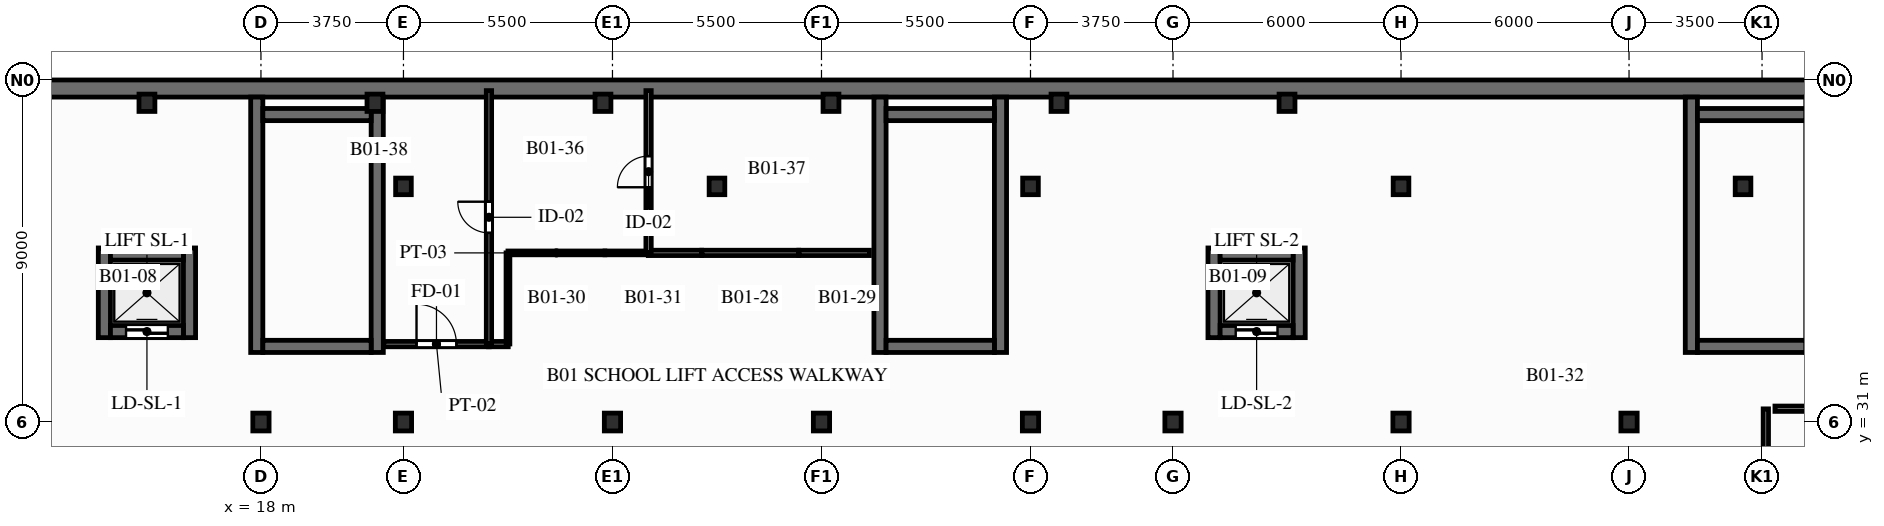
"""IFC4 building model, lengths in metres.
Left out: names, types, materials, properties, quantities, classifications, styles, units other than length and angle.
Written with IfcOpenShell. Run it as: python <this file> out.ifc"""

import sys

from ifc_helpers import new_model, si_unit, direction, frame, frame_2d, origin, origin_2d, place, context, subcontext, project, spatial, rectangle, i_section, extrude, element, fill, save


model = new_model("IFC4")
c1 = context("Model", 3, precision=1e-05, world=origin(), true_north=direction((0.0, 1.0)))
c2 = subcontext(c1, "Body", "Model", "MODEL_VIEW")
j1 = project(units=[si_unit("LENGTHUNIT", "METRE"), si_unit("PLANEANGLEUNIT", "RADIAN")], contexts=[c1])
p1 = place(None, origin())
s1 = spatial("IfcSite", under=j1, at=p1, CompositionType="ELEMENT")
p2 = place(p1, origin())
s2 = spatial("IfcBuilding", under=s1, at=p2, CompositionType="ELEMENT")
p3 = place(p2, frame((0.0, 0.0, -4.2)))
s3 = spatial("IfcBuildingStorey", under=s2, at=p3, CompositionType="ELEMENT", Elevation=-4.2)
for number, where, z_axis, x_axis in (
    (1, (15.0, 39.4, 0.0), (0.0, 0.0, 1.0), (1.0, 0.0, 0.0)),
    (2, (21.0, 39.4, 0.0), (0.0, 0.0, 1.0), (1.0, 0.0, 0.0)),
    (3, (27.0, 39.4, 0.0), (0.0, 0.0, 1.0), (1.0, 0.0, 0.0)),
    (4, (33.0, 39.4, 0.0), (0.0, 0.0, 1.0), (1.0, 0.0, 0.0)),
    (5, (39.0, 39.4, 0.0), (0.0, 0.0, 1.0), (1.0, 0.0, 0.0)),
    (6, (45.0, 39.4, 0.0), (0.0, 0.0, 1.0), (1.0, 0.0, 0.0)),
):
    element("IfcColumn", number, at=place(p3, frame(where, z_axis=z_axis, x_axis=x_axis)), inside=s3, PredefinedType="COLUMN", context=c2, shape_type="SweptSolid", body=[
        extrude(i_section(OverallWidth=0.418, OverallDepth=0.456, WebThickness=0.042, FlangeThickness=0.067, FilletRadius=0.015, at=origin_2d()), origin(), (0.0, 0.0, 1.0), 4.2),
    ])
for number, where, z_axis, x_axis in (
    (7, (18.0, 31.0, 0.0), (0.0, 0.0, 1.0), (1.0, 0.0, 0.0)),
    (8, (21.75, 31.0, 0.0), (0.0, 0.0, 1.0), (1.0, 0.0, 0.0)),
):
    element("IfcColumn", number, at=place(p3, frame(where, z_axis=z_axis, x_axis=x_axis)), inside=s3, PredefinedType="COLUMN", context=c2, shape_type="SweptSolid", body=[
        extrude(i_section(OverallWidth=0.428, OverallDepth=0.469, WebThickness=0.078, FlangeThickness=0.125, FilletRadius=0.015, at=origin_2d()), origin(), (0.0, 0.0, 1.0), 4.2),
    ])
p4 = place(p3, frame((21.75, 37.2, 0.0), z_axis=(0.0, 0.0, 1.0), x_axis=(1.0, 0.0, 0.0)))
e9 = element("IfcColumn", 9, at=p4, inside=s3, PredefinedType="COLUMN", context=c2, shape_type="SweptSolid", body=[
    extrude(i_section(OverallWidth=0.412, OverallDepth=0.437, WebThickness=0.036, FlangeThickness=0.058, FilletRadius=0.015, at=origin_2d()), origin(), (0.0, 0.0, 1.0), 4.2),
])
p5 = place(p3, frame((27.25, 31.0, 0.0), z_axis=(0.0, 0.0, 1.0), x_axis=(1.0, 0.0, 0.0)))
e10 = element("IfcColumn", 10, at=p5, inside=s3, PredefinedType="COLUMN", context=c2, shape_type="SweptSolid", body=[
    extrude(i_section(OverallWidth=0.428, OverallDepth=0.469, WebThickness=0.078, FlangeThickness=0.125, FilletRadius=0.015, at=origin_2d()), origin(), (0.0, 0.0, 1.0), 4.2),
])
p6 = place(p3, frame((30.0, 37.2, 0.0), z_axis=(0.0, 0.0, 1.0), x_axis=(1.0, 0.0, 0.0)))
e11 = element("IfcColumn", 11, at=p6, inside=s3, PredefinedType="COLUMN", context=c2, shape_type="SweptSolid", body=[
    extrude(i_section(OverallWidth=0.412, OverallDepth=0.437, WebThickness=0.036, FlangeThickness=0.058, FilletRadius=0.015, at=origin_2d()), origin(), (0.0, 0.0, 1.0), 4.2),
])
for number, where, z_axis, x_axis in (
    (12, (32.75, 31.0, 0.0), (0.0, 0.0, 1.0), (1.0, 0.0, 0.0)),
    (13, (38.25, 31.0, 0.0), (0.0, 0.0, 1.0), (1.0, 0.0, 0.0)),
):
    element("IfcColumn", number, at=place(p3, frame(where, z_axis=z_axis, x_axis=x_axis)), inside=s3, PredefinedType="COLUMN", context=c2, shape_type="SweptSolid", body=[
        extrude(i_section(OverallWidth=0.428, OverallDepth=0.469, WebThickness=0.078, FlangeThickness=0.125, FilletRadius=0.015, at=origin_2d()), origin(), (0.0, 0.0, 1.0), 4.2),
    ])
p7 = place(p3, frame((38.25, 37.2, 0.0), z_axis=(0.0, 0.0, 1.0), x_axis=(1.0, 0.0, 0.0)))
e14 = element("IfcColumn", 14, at=p7, inside=s3, PredefinedType="COLUMN", context=c2, shape_type="SweptSolid", body=[
    extrude(i_section(OverallWidth=0.412, OverallDepth=0.437, WebThickness=0.036, FlangeThickness=0.058, FilletRadius=0.015, at=origin_2d()), origin(), (0.0, 0.0, 1.0), 4.2),
])
for number, where, z_axis, x_axis in (
    (15, (42.0, 31.0, 0.0), (0.0, 0.0, 1.0), (1.0, 0.0, 0.0)),
    (16, (48.0, 31.0, 0.0), (0.0, 0.0, 1.0), (1.0, 0.0, 0.0)),
):
    element("IfcColumn", number, at=place(p3, frame(where, z_axis=z_axis, x_axis=x_axis)), inside=s3, PredefinedType="COLUMN", context=c2, shape_type="SweptSolid", body=[
        extrude(i_section(OverallWidth=0.428, OverallDepth=0.469, WebThickness=0.078, FlangeThickness=0.125, FilletRadius=0.015, at=origin_2d()), origin(), (0.0, 0.0, 1.0), 4.2),
    ])
p8 = place(p3, frame((48.0, 37.2, 0.0), z_axis=(0.0, 0.0, 1.0), x_axis=(1.0, 0.0, 0.0)))
e17 = element("IfcColumn", 17, at=p8, inside=s3, PredefinedType="COLUMN", context=c2, shape_type="SweptSolid", body=[
    extrude(i_section(OverallWidth=0.412, OverallDepth=0.437, WebThickness=0.036, FlangeThickness=0.058, FilletRadius=0.015, at=origin_2d()), origin(), (0.0, 0.0, 1.0), 4.2),
])
p9 = place(p3, frame((54.0, 31.0, 0.0), z_axis=(0.0, 0.0, 1.0), x_axis=(1.0, 0.0, 0.0)))
e18 = element("IfcColumn", 18, at=p9, inside=s3, PredefinedType="COLUMN", context=c2, shape_type="SweptSolid", body=[
    extrude(i_section(OverallWidth=0.428, OverallDepth=0.469, WebThickness=0.078, FlangeThickness=0.125, FilletRadius=0.015, at=origin_2d()), origin(), (0.0, 0.0, 1.0), 4.2),
])
p10 = place(p3, frame((57.0, 37.2, 0.0), z_axis=(0.0, 0.0, 1.0), x_axis=(1.0, 0.0, 0.0)))
e19 = element("IfcColumn", 19, at=p10, inside=s3, PredefinedType="COLUMN", context=c2, shape_type="SweptSolid", body=[
    extrude(i_section(OverallWidth=0.412, OverallDepth=0.437, WebThickness=0.036, FlangeThickness=0.058, FilletRadius=0.015, at=origin_2d()), origin(), (0.0, 0.0, 1.0), 4.2),
])
p11 = place(p3, frame((70.775, 39.775, 0.0), z_axis=(0.0, 0.0, 1.0), x_axis=(-1.0, 0.0, 0.0)))
e20 = element("IfcWall", 20, at=p11, inside=s3, PredefinedType="SHEAR", context=c2, shape_type="SweptSolid", body=[
    extrude(rectangle(XDim=81.55, YDim=0.45, at=frame_2d((40.775, 0.0))), origin(), (0.0, 0.0, 1.0), 3.22),
])
for number, where, z_axis, x_axis in (
    (21, (13.88, 33.22, 0.0), (0.0, 0.0, 1.0), (0.0, 1.0, 0.0)),
    (22, (16.12, 33.22, 0.0), (0.0, 0.0, 1.0), (0.0, 1.0, 0.0)),
):
    element("IfcWall", number, at=place(p3, frame(where, z_axis=z_axis, x_axis=x_axis)), inside=s3, PredefinedType="SHEAR", context=c2, shape_type="SweptSolid", body=[
        extrude(rectangle(XDim=2.36, YDim=0.32, at=frame_2d((1.18, 0.0))), origin(), (0.0, 0.0, 1.0), 3.86),
    ])
p12 = place(p3, frame((14.04, 33.38, 0.0), z_axis=(0.0, 0.0, 1.0), x_axis=(1.0, 0.0, 0.0)))
e23 = element("IfcWall", 23, at=p12, inside=s3, PredefinedType="SHEAR", context=c2, shape_type="SweptSolid", body=[
    extrude(rectangle(XDim=1.92, YDim=0.32, at=frame_2d((0.96, 0.0))), origin(), (0.0, 0.0, 1.0), 3.86),
])
p13 = place(p12, frame((0.41, 0.0, 0.0)))
e24 = element("IfcOpeningElement", 24, at=p13, cuts=e23, PredefinedType="OPENING", context=c2, shape_type="SweptSolid", body=[
    extrude(rectangle(XDim=1.1, YDim=2.06, at=frame_2d((0.55, 1.03))), frame((0.0, 0.17, 0.0), z_axis=(0.0, -1.0, 0.0), x_axis=(1.0, 0.0, 0.0)), (0.0, 0.0, 1.0), 0.34),
])
p14 = place(p3, frame((14.04, 35.42, 0.0), z_axis=(0.0, 0.0, 1.0), x_axis=(1.0, 0.0, 0.0)))
e25 = element("IfcWall", 25, at=p14, inside=s3, PredefinedType="SHEAR", context=c2, shape_type="SweptSolid", body=[
    extrude(rectangle(XDim=1.92, YDim=0.32, at=frame_2d((0.96, 0.0))), origin(), (0.0, 0.0, 1.0), 3.86),
])
for number, where, z_axis, x_axis in (
    (26, (43.08, 33.22, 0.0), (0.0, 0.0, 1.0), (0.0, 1.0, 0.0)),
    (27, (45.32, 33.22, 0.0), (0.0, 0.0, 1.0), (0.0, 1.0, 0.0)),
):
    element("IfcWall", number, at=place(p3, frame(where, z_axis=z_axis, x_axis=x_axis)), inside=s3, PredefinedType="SHEAR", context=c2, shape_type="SweptSolid", body=[
        extrude(rectangle(XDim=2.36, YDim=0.32, at=frame_2d((1.18, 0.0))), origin(), (0.0, 0.0, 1.0), 3.86),
    ])
p15 = place(p3, frame((43.24, 33.38, 0.0), z_axis=(0.0, 0.0, 1.0), x_axis=(1.0, 0.0, 0.0)))
e28 = element("IfcWall", 28, at=p15, inside=s3, PredefinedType="SHEAR", context=c2, shape_type="SweptSolid", body=[
    extrude(rectangle(XDim=1.92, YDim=0.32, at=frame_2d((0.96, 0.0))), origin(), (0.0, 0.0, 1.0), 3.86),
])
p16 = place(p15, frame((0.41, 0.0, 0.0)))
e29 = element("IfcOpeningElement", 29, at=p16, cuts=e28, PredefinedType="OPENING", context=c2, shape_type="SweptSolid", body=[
    extrude(rectangle(XDim=1.1, YDim=2.06, at=frame_2d((0.55, 1.03))), frame((0.0, 0.17, 0.0), z_axis=(0.0, -1.0, 0.0), x_axis=(1.0, 0.0, 0.0)), (0.0, 0.0, 1.0), 0.34),
])
p17 = place(p3, frame((43.24, 35.42, 0.0), z_axis=(0.0, 0.0, 1.0), x_axis=(1.0, 0.0, 0.0)))
e30 = element("IfcWall", 30, at=p17, inside=s3, PredefinedType="SHEAR", context=c2, shape_type="SweptSolid", body=[
    extrude(rectangle(XDim=1.92, YDim=0.32, at=frame_2d((0.96, 0.0))), origin(), (0.0, 0.0, 1.0), 3.86),
])
for number, where, z_axis, x_axis in (
    (31, (17.89, 32.83, 0.0), (0.0, 0.0, 1.0), (0.0, 1.0, 0.0)),
    (32, (21.06, 32.83, 0.0), (0.0, 0.0, 1.0), (0.0, 1.0, 0.0)),
):
    element("IfcWall", number, at=place(p3, frame(where, z_axis=z_axis, x_axis=x_axis)), inside=s3, PredefinedType="SHEAR", context=c2, shape_type="SweptSolid", body=[
        extrude(rectangle(XDim=6.72, YDim=0.32, at=frame_2d((3.36, 0.0))), origin(), (0.0, 0.0, 1.0), 3.86),
    ])
for number, where, z_axis, x_axis in (
    (33, (18.05, 32.99, 0.0), (0.0, 0.0, 1.0), (1.0, 0.0, 0.0)),
    (34, (18.05, 39.09, 0.0), (0.0, 0.0, 1.0), (1.0, 0.0, 0.0)),
):
    element("IfcWall", number, at=place(p3, frame(where, z_axis=z_axis, x_axis=x_axis)), inside=s3, PredefinedType="SHEAR", context=c2, shape_type="SweptSolid", body=[
        extrude(rectangle(XDim=2.85, YDim=0.32, at=frame_2d((1.425, 0.0))), origin(), (0.0, 0.0, 1.0), 3.86),
    ])
for number, where, z_axis, x_axis in (
    (35, (34.29, 32.83, 0.0), (0.0, 0.0, 1.0), (0.0, 1.0, 0.0)),
    (36, (37.46, 32.83, 0.0), (0.0, 0.0, 1.0), (0.0, 1.0, 0.0)),
):
    element("IfcWall", number, at=place(p3, frame(where, z_axis=z_axis, x_axis=x_axis)), inside=s3, PredefinedType="SHEAR", context=c2, shape_type="SweptSolid", body=[
        extrude(rectangle(XDim=6.72, YDim=0.32, at=frame_2d((3.36, 0.0))), origin(), (0.0, 0.0, 1.0), 3.86),
    ])
for number, where, z_axis, x_axis in (
    (37, (34.45, 32.99, 0.0), (0.0, 0.0, 1.0), (1.0, 0.0, 0.0)),
    (38, (34.45, 39.09, 0.0), (0.0, 0.0, 1.0), (1.0, 0.0, 0.0)),
):
    element("IfcWall", number, at=place(p3, frame(where, z_axis=z_axis, x_axis=x_axis)), inside=s3, PredefinedType="SHEAR", context=c2, shape_type="SweptSolid", body=[
        extrude(rectangle(XDim=2.85, YDim=0.32, at=frame_2d((1.425, 0.0))), origin(), (0.0, 0.0, 1.0), 3.86),
    ])
p18 = place(p3, frame((55.64, 32.83, 0.0), z_axis=(0.0, 0.0, 1.0), x_axis=(0.0, 1.0, 0.0)))
e39 = element("IfcWall", 39, at=p18, inside=s3, PredefinedType="SHEAR", context=c2, shape_type="SweptSolid", body=[
    extrude(rectangle(XDim=6.72, YDim=0.32, at=frame_2d((3.36, 0.0))), origin(), (0.0, 0.0, 1.0), 3.86),
])
for number, where, z_axis, x_axis in (
    (40, (55.8, 32.99, 0.0), (0.0, 0.0, 1.0), (1.0, 0.0, 0.0)),
    (41, (55.8, 39.09, 0.0), (0.0, 0.0, 1.0), (1.0, 0.0, 0.0)),
):
    element("IfcWall", number, at=place(p3, frame(where, z_axis=z_axis, x_axis=x_axis)), inside=s3, PredefinedType="SHEAR", context=c2, shape_type="SweptSolid", body=[
        extrude(rectangle(XDim=2.85, YDim=0.32, at=frame_2d((1.425, 0.0))), origin(), (0.0, 0.0, 1.0), 3.86),
    ])
p19 = place(p3, frame((23.989, 33.05, 0.0), z_axis=(0.0, 0.0, 1.0), x_axis=(1.0, 0.0, 0.0)))
e42 = element("IfcWall", 42, at=p19, inside=s3, PredefinedType="PARTITIONING", context=c2, shape_type="SweptSolid", body=[
    extrude(rectangle(XDim=0.519, YDim=0.14, at=frame_2d((0.259, 0.0))), origin(), (0.0, 0.0, 1.0), 3.86),
])
p20 = place(p3, frame((21.23, 33.05, 0.0), z_axis=(0.0, 0.0, 1.0), x_axis=(1.0, 0.0, 0.0)))
e43 = element("IfcWall", 43, at=p20, inside=s3, PredefinedType="PARTITIONING", context=c2, shape_type="SweptSolid", body=[
    extrude(rectangle(XDim=2.777, YDim=0.14, at=frame_2d((1.389, 0.0))), origin(), (0.0, 0.0, 1.0), 2.908),
])
p21 = place(p20, frame((0.864, 0.0, 0.0)))
e44 = element("IfcOpeningElement", 44, at=p21, cuts=e43, PredefinedType="OPENING", context=c2, shape_type="SweptSolid", body=[
    extrude(rectangle(XDim=1.05, YDim=2.06, at=frame_2d((0.525, 1.03))), frame((0.0, 0.08, 0.0), z_axis=(0.0, -1.0, 0.0), x_axis=(1.0, 0.0, 0.0)), (0.0, 0.0, 1.0), 0.16),
])
p22 = place(p3, frame((29.6, 35.45, 0.0), z_axis=(0.0, 0.0, 1.0), x_axis=(1.0, 0.0, 0.0)))
e45 = element("IfcWall", 45, at=p22, inside=s3, PredefinedType="PARTITIONING", context=c2, shape_type="SweptSolid", body=[
    extrude(rectangle(XDim=2.55, YDim=0.14, at=frame_2d((1.275, 0.0))), origin(), (0.0, 0.0, 1.0), 3.86),
])
p23 = place(p3, frame((32.154, 35.45, 0.0), z_axis=(0.0, 0.0, 1.0), x_axis=(1.0, 0.0, 0.0)))
e46 = element("IfcWall", 46, at=p23, inside=s3, PredefinedType="PARTITIONING", context=c2, shape_type="SweptSolid", body=[
    extrude(rectangle(XDim=1.857, YDim=0.14, at=frame_2d((0.929, 0.0))), origin(), (0.0, 0.0, 1.0), 3.86),
])
p24 = place(p3, frame((24.5, 35.45, 0.0), z_axis=(0.0, 0.0, 1.0), x_axis=(1.0, 0.0, 0.0)))
e47 = element("IfcWall", 47, at=p24, inside=s3, PredefinedType="PARTITIONING", context=c2, shape_type="SweptSolid", body=[
    extrude(rectangle(XDim=2.55, YDim=0.1, at=frame_2d((1.275, 0.0))), origin(), (0.0, 0.0, 1.0), 3.86),
])
p25 = place(p3, frame((24.5, 33.054, 0.0), z_axis=(0.0, 0.0, 1.0), x_axis=(0.0, 1.0, 0.0)))
e48 = element("IfcWall", 48, at=p25, inside=s3, PredefinedType="PARTITIONING", context=c2, shape_type="SweptSolid", body=[
    extrude(rectangle(XDim=2.396, YDim=0.1, at=frame_2d((1.198, 0.0))), origin(), (0.0, 0.0, 1.0), 3.378),
])
p26 = place(p3, frame((27.054, 35.45, 0.0), z_axis=(0.0, 0.0, 1.0), x_axis=(1.0, 0.0, 0.0)))
e49 = element("IfcWall", 49, at=p26, inside=s3, PredefinedType="PARTITIONING", context=c2, shape_type="SweptSolid", body=[
    extrude(rectangle(XDim=1.157, YDim=0.1, at=frame_2d((0.579, 0.0))), origin(), (0.0, 0.0, 1.0), 3.86),
])
p27 = place(p3, frame((28.193, 35.45, 0.0), z_axis=(0.0, 0.0, 1.0), x_axis=(1.0, 0.0, 0.0)))
e50 = element("IfcWall", 50, at=p27, inside=s3, PredefinedType="PARTITIONING", context=c2, shape_type="SweptSolid", body=[
    extrude(rectangle(XDim=1.403, YDim=0.14, at=frame_2d((0.702, 0.0))), origin(), (0.0, 0.0, 1.0), 3.86),
])
p28 = place(p3, frame((57.6, 21.993, 0.0), z_axis=(0.0, 0.0, 1.0), x_axis=(0.0, 1.0, 0.0)))
e51 = element("IfcWall", 51, at=p28, inside=s3, PredefinedType="PARTITIONING", context=c2, shape_type="SweptSolid", body=[
    extrude(rectangle(XDim=9.353, YDim=0.14, at=frame_2d((4.677, 0.0))), origin(), (0.0, 0.0, 1.0), 3.223),
])
p29 = place(p28, frame((4.267, 0.0, 0.0)))
e52 = element("IfcOpeningElement", 52, at=p29, cuts=e51, PredefinedType="OPENING", context=c2, shape_type="SweptSolid", body=[
    extrude(rectangle(XDim=0.82, YDim=2.02, at=frame_2d((0.41, 1.01))), frame((0.0, 0.08, 0.0), z_axis=(0.0, -1.0, 0.0), x_axis=(1.0, 0.0, 0.0)), (0.0, 0.0, 1.0), 0.16),
])
p30 = place(p3, frame((28.2, 35.454, 0.0), z_axis=(0.0, 0.0, 1.0), x_axis=(0.0, 1.0, 0.0)))
e53 = element("IfcWall", 53, at=p30, inside=s3, PredefinedType="PARTITIONING", context=c2, shape_type="SweptSolid", body=[
    extrude(rectangle(XDim=4.266, YDim=0.14, at=frame_2d((2.133, 0.0))), origin(), (0.0, 0.0, 1.0), 3.223),
])
p31 = place(p30, frame((1.723, 0.0, 0.0)))
e54 = element("IfcOpeningElement", 54, at=p31, cuts=e53, PredefinedType="OPENING", context=c2, shape_type="SweptSolid", body=[
    extrude(rectangle(XDim=0.82, YDim=2.02, at=frame_2d((0.41, 1.01))), frame((0.0, 0.08, 0.0), z_axis=(0.0, -1.0, 0.0), x_axis=(1.0, 0.0, 0.0)), (0.0, 0.0, 1.0), 0.16),
])
p32 = place(p3, frame((24.0, 33.054, 0.0), z_axis=(0.0, 0.0, 1.0), x_axis=(0.0, 1.0, 0.0)))
e55 = element("IfcWall", 55, at=p32, inside=s3, PredefinedType="PARTITIONING", context=c2, shape_type="SweptSolid", body=[
    extrude(rectangle(XDim=6.666, YDim=0.14, at=frame_2d((3.333, 0.0))), origin(), (0.0, 0.0, 1.0), 3.223),
])
p33 = place(p32, frame((2.923, 0.0, 0.0)))
e56 = element("IfcOpeningElement", 56, at=p33, cuts=e55, PredefinedType="OPENING", context=c2, shape_type="SweptSolid", body=[
    extrude(rectangle(XDim=0.82, YDim=2.02, at=frame_2d((0.41, 1.01))), frame((0.0, 0.08, 0.0), z_axis=(0.0, -1.0, 0.0), x_axis=(1.0, 0.0, 0.0)), (0.0, 0.0, 1.0), 0.16),
])
p34 = place(p3, frame((57.84, 31.35, 0.0), z_axis=(0.0, 0.0, 1.0), x_axis=(1.0, 0.0, 0.0)))
e57 = element("IfcWall", 57, at=p34, inside=s3, PredefinedType="PARTITIONING", context=c2, shape_type="SweptSolid", body=[
    extrude(rectangle(XDim=12.695, YDim=0.14, at=frame_2d((6.348, 0.0))), origin(), (0.0, 0.0, 1.0), 2.908),
])
p35 = place(p13, origin())
e58 = element("IfcDoor", 58, at=p35, inside=s3, OperationType="SLIDING_TO_LEFT", PredefinedType="DOOR", context=c2, shape_type="SweptSolid", body=[
    extrude(rectangle(XDim=1.1, YDim=2.06, at=frame_2d((0.55, 1.03))), frame((0.0, 0.025, 0.0), z_axis=(0.0, -1.0, 0.0), x_axis=(1.0, 0.0, 0.0)), (0.0, 0.0, 1.0), 0.05),
])
fill(e24, e58)
p36 = place(p16, origin())
e59 = element("IfcDoor", 59, at=p36, inside=s3, OperationType="SLIDING_TO_RIGHT", PredefinedType="DOOR", context=c2, shape_type="SweptSolid", body=[
    extrude(rectangle(XDim=1.1, YDim=2.06, at=frame_2d((0.55, 1.03))), frame((0.0, 0.025, 0.0), z_axis=(0.0, -1.0, 0.0), x_axis=(1.0, 0.0, 0.0)), (0.0, 0.0, 1.0), 0.05),
])
fill(e29, e59)
p37 = place(p21, origin())
e60 = element("IfcDoor", 60, at=p37, inside=s3, OperationType="SINGLE_SWING_LEFT", PredefinedType="DOOR", context=c2, shape_type="SweptSolid", body=[
    extrude(rectangle(XDim=1.05, YDim=2.06, at=frame_2d((0.525, 1.03))), frame((0.0, 0.025, 0.0), z_axis=(0.0, -1.0, 0.0), x_axis=(1.0, 0.0, 0.0)), (0.0, 0.0, 1.0), 0.05),
])
fill(e44, e60)
p38 = place(p33, origin())
e61 = element("IfcDoor", 61, at=p38, inside=s3, OperationType="SINGLE_SWING_RIGHT", PredefinedType="DOOR", context=c2, shape_type="SweptSolid", body=[
    extrude(rectangle(XDim=0.82, YDim=2.02, at=frame_2d((0.41, 1.01))), frame((0.0, 0.025, 0.0), z_axis=(0.0, -1.0, 0.0), x_axis=(1.0, 0.0, 0.0)), (0.0, 0.0, 1.0), 0.05),
])
fill(e56, e61)
p39 = place(p31, origin())
e62 = element("IfcDoor", 62, at=p39, inside=s3, OperationType="SINGLE_SWING_LEFT", PredefinedType="DOOR", context=c2, shape_type="SweptSolid", body=[
    extrude(rectangle(XDim=0.82, YDim=2.02, at=frame_2d((0.41, 1.01))), frame((0.0, 0.025, 0.0), z_axis=(0.0, -1.0, 0.0), x_axis=(1.0, 0.0, 0.0)), (0.0, 0.0, 1.0), 0.05),
])
fill(e54, e62)
save(model, sys.argv[1])
